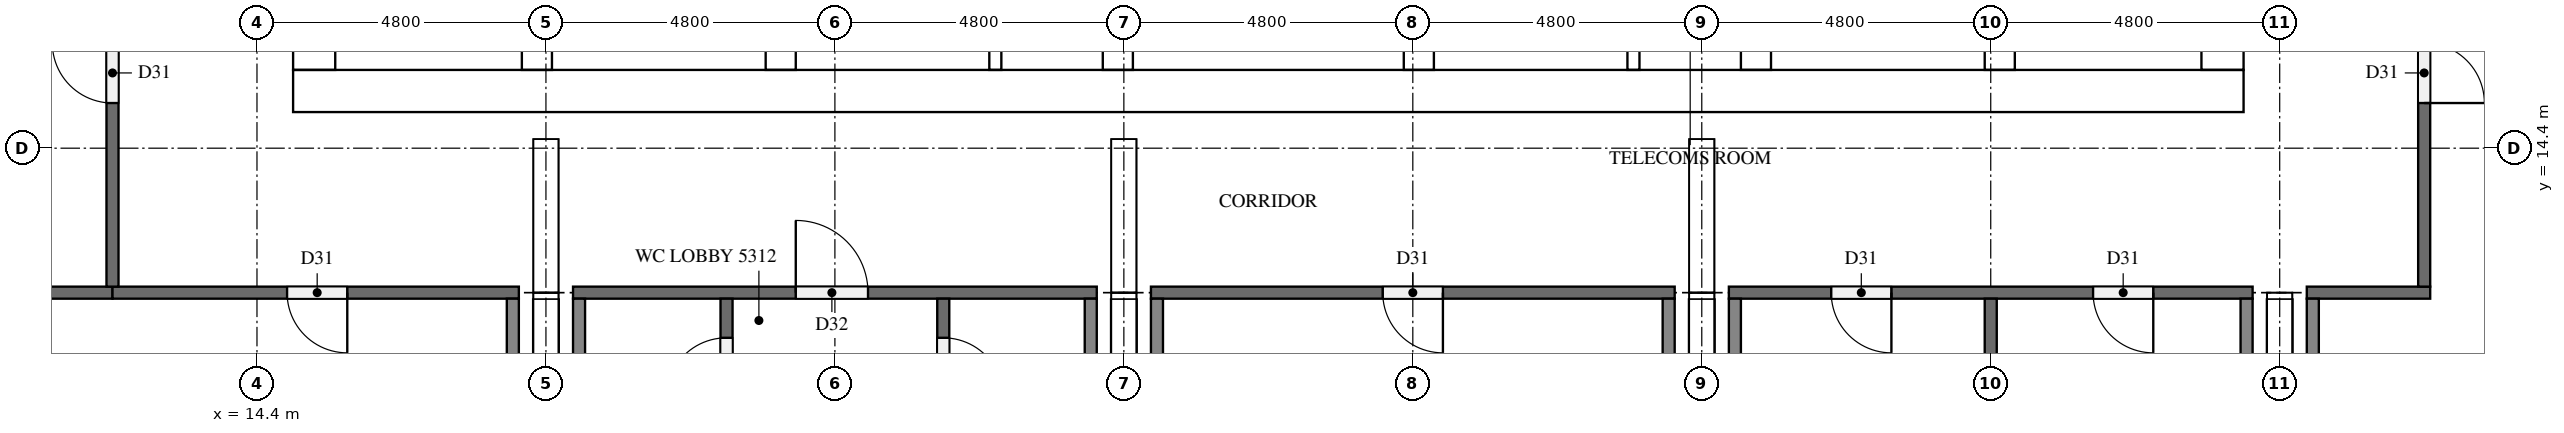
"""IFC4 building model, lengths in metres.
Left out: names, types, materials, properties, quantities, classifications, styles, units other than length and angle.
Written with IfcOpenShell. Run it as: python <this file> out.ifc"""

import sys

from ifc_helpers import new_model, si_unit, direction, frame, frame_2d, origin, place, context, subcontext, project, spatial, rectangle, extrude, element, fill, save


model = new_model("IFC4")
c1 = context("Model", 3, precision=1e-05, world=origin(), true_north=direction((0.0, 1.0)))
c2 = subcontext(c1, "Body", "Model", "MODEL_VIEW")
j1 = project(units=[si_unit("LENGTHUNIT", "METRE"), si_unit("PLANEANGLEUNIT", "RADIAN")], contexts=[c1])
p1 = place(None, origin())
s1 = spatial("IfcSite", under=j1, at=p1, CompositionType="ELEMENT")
p2 = place(p1, origin())
s2 = spatial("IfcBuilding", under=s1, at=p2, CompositionType="ELEMENT")
p3 = place(p2, frame((0.0, 0.0, 203.4)))
s3 = spatial("IfcBuildingStorey", under=s2, at=p3, CompositionType="ELEMENT", Elevation=203.4)
p4 = place(p3, frame((15.0, 15.35, 0.0), z_axis=(0.0, 0.0, 1.0), x_axis=(1.0, 0.0, 0.0)))
e1 = element("IfcWall", 1, at=p4, inside=s3, PredefinedType="SHEAR", context=c2, shape_type="SweptSolid", body=[
    extrude(rectangle(XDim=32.4, YDim=0.7, at=frame_2d((16.2, 0.0))), origin(), (0.0, 0.0, 1.0), 5.1),
])
p5 = place(p4, frame((15.3, 0.0, 0.0)))
e2 = element("IfcOpeningElement", 2, at=p5, cuts=e1, PredefinedType="OPENING", context=c2, shape_type="SweptSolid", body=[
    extrude(rectangle(XDim=1.8, YDim=2.1, at=frame_2d((0.9, 1.05))), frame((0.0, 0.36, 0.0), z_axis=(0.0, -1.0, 0.0), x_axis=(1.0, 0.0, 0.0)), (0.0, 0.0, 1.0), 0.72),
])
p6 = place(p3, frame((15.35, 15.7, 0.0), z_axis=(0.0, 0.0, 1.0), x_axis=(0.0, 1.0, 0.0)))
e3 = element("IfcWall", 3, at=p6, inside=s3, PredefinedType="SHEAR", context=c2, shape_type="SweptSolid", body=[
    extrude(rectangle(XDim=21.4, YDim=0.7, at=frame_2d((10.7, 0.0))), origin(), (0.0, 0.0, 1.0), 5.1),
])
p7 = place(p6, frame((5.06, 0.0, 0.0)))
e4 = element("IfcOpeningElement", 4, at=p7, cuts=e3, PredefinedType="OPENING", context=c2, shape_type="SweptSolid", body=[
    extrude(rectangle(XDim=1.2, YDim=2.1, at=frame_2d((0.6, 1.05))), frame((0.0, 0.36, 0.0), z_axis=(0.0, -1.0, 0.0), x_axis=(1.0, 0.0, 0.0)), (0.0, 0.0, 1.0), 0.72),
])
p8 = place(p3, frame((47.05, 15.7, 0.0), z_axis=(0.0, 0.0, 1.0), x_axis=(0.0, 1.0, 0.0)))
e5 = element("IfcWall", 5, at=p8, inside=s3, PredefinedType="SHEAR", context=c2, shape_type="SweptSolid", body=[
    extrude(rectangle(XDim=21.4, YDim=0.7, at=frame_2d((10.7, 0.0))), origin(), (0.0, 0.0, 1.0), 5.1),
])
p9 = place(p8, frame((10.4, 0.0, 0.0)))
e6 = element("IfcOpeningElement", 6, at=p9, cuts=e5, PredefinedType="OPENING", context=c2, shape_type="SweptSolid", body=[
    extrude(rectangle(XDim=1.2, YDim=2.1, at=frame_2d((0.6, 1.05))), frame((0.0, 0.36, 0.0), z_axis=(0.0, -1.0, 0.0), x_axis=(1.0, 0.0, 0.0)), (0.0, 0.0, 1.0), 0.72),
])
p10 = place(p3, frame((19.05, 15.7, 0.0), z_axis=(0.0, 0.0, 1.0), x_axis=(0.0, 1.0, 0.0)))
e7 = element("IfcWall", 7, at=p10, inside=s3, PredefinedType="SHEAR", context=c2, shape_type="SweptSolid", body=[
    extrude(rectangle(XDim=15.3, YDim=0.5, at=frame_2d((7.65, 0.0))), origin(), (0.0, 0.0, 1.0), 5.1),
])
p11 = place(p10, frame((9.75, 0.0, 0.0)))
e8 = element("IfcOpeningElement", 8, at=p11, cuts=e7, PredefinedType="OPENING", context=c2, shape_type="SweptSolid", body=[
    extrude(rectangle(XDim=1.1, YDim=2.1, at=frame_2d((0.55, 1.05))), frame((0.0, 0.26, 0.0), z_axis=(0.0, -1.0, 0.0), x_axis=(1.0, 0.0, 0.0)), (0.0, 0.0, 1.0), 0.52),
])
p12 = place(p10, frame((13.25, 0.0, 0.0)))
e9 = element("IfcOpeningElement", 9, at=p12, cuts=e7, PredefinedType="OPENING", context=c2, shape_type="SweptSolid", body=[
    extrude(rectangle(XDim=1.1, YDim=2.1, at=frame_2d((0.55, 1.05))), frame((0.0, 0.26, 0.0), z_axis=(0.0, -1.0, 0.0), x_axis=(1.0, 0.0, 0.0)), (0.0, 0.0, 1.0), 0.52),
])
p13 = place(p10, frame((0.5, 0.0, 0.0)))
e10 = element("IfcOpeningElement", 10, at=p13, cuts=e7, PredefinedType="OPENING", context=c2, shape_type="SweptSolid", body=[
    extrude(rectangle(XDim=1.2, YDim=2.1, at=frame_2d((0.6, 1.05))), frame((0.0, 0.26, 0.0), z_axis=(0.0, -1.0, 0.0), x_axis=(1.0, 0.0, 0.0)), (0.0, 0.0, 1.0), 0.52),
])
p14 = place(p3, frame((23.1, 15.7, 0.0), z_axis=(0.0, 0.0, 1.0), x_axis=(0.0, 1.0, 0.0)))
e11 = element("IfcWall", 11, at=p14, inside=s3, PredefinedType="SHEAR", context=c2, shape_type="SweptSolid", body=[
    extrude(rectangle(XDim=21.4, YDim=0.5, at=frame_2d((10.7, 0.0))), origin(), (0.0, 0.0, 1.0), 5.1),
])
p15 = place(p3, frame((39.3, 15.7, 0.0), z_axis=(0.0, 0.0, 1.0), x_axis=(0.0, 1.0, 0.0)))
e12 = element("IfcWall", 12, at=p15, inside=s3, PredefinedType="SHEAR", context=c2, shape_type="SweptSolid", body=[
    extrude(rectangle(XDim=8.55, YDim=0.5, at=frame_2d((4.275, 0.0))), origin(), (0.0, 0.0, 1.0), 5.1),
])
p16 = place(p3, frame((43.35, 15.7, 0.0), z_axis=(0.0, 0.0, 1.0), x_axis=(0.0, 1.0, 0.0)))
e13 = element("IfcWall", 13, at=p16, inside=s3, PredefinedType="SHEAR", context=c2, shape_type="SweptSolid", body=[
    extrude(rectangle(XDim=8.55, YDim=0.5, at=frame_2d((4.275, 0.0))), origin(), (0.0, 0.0, 1.0), 5.1),
])
p17 = place(p16, frame((0.5, 0.0, 0.0)))
e14 = element("IfcOpeningElement", 14, at=p17, cuts=e13, PredefinedType="OPENING", context=c2, shape_type="SweptSolid", body=[
    extrude(rectangle(XDim=1.2, YDim=2.1, at=frame_2d((0.6, 1.05))), frame((0.0, 0.26, 0.0), z_axis=(0.0, -1.0, 0.0), x_axis=(1.0, 0.0, 0.0)), (0.0, 0.0, 1.0), 0.52),
])
for number, where, z_axis, x_axis in (
    (15, (28.7, 15.7, 0.0), (0.0, 0.0, 1.0), (0.0, 1.0, 0.0)),
    (16, (33.7, 15.7, 0.0), (0.0, 0.0, 1.0), (0.0, 1.0, 0.0)),
):
    element("IfcWall", number, at=place(p3, frame(where, z_axis=z_axis, x_axis=x_axis)), inside=s3, PredefinedType="SHEAR", context=c2, shape_type="SweptSolid", body=[
        extrude(rectangle(XDim=2.8, YDim=0.5, at=frame_2d((1.4, 0.0))), origin(), (0.0, 0.0, 1.0), 5.1),
    ])
for number, where, z_axis, x_axis in (
    (17, (26.665, 15.7, 0.0), (0.0, 0.0, 1.0), (0.0, 1.0, 0.0)),
    (18, (37.265, 15.7, 0.0), (0.0, 0.0, 1.0), (0.0, 1.0, 0.0)),
):
    element("IfcWall", number, at=place(p3, frame(where, z_axis=z_axis, x_axis=x_axis)), inside=s3, PredefinedType="PARTITIONING", context=c2, shape_type="SweptSolid", body=[
        extrude(rectangle(XDim=2.8, YDim=0.2, at=frame_2d((1.4, 0.0))), origin(), (0.0, 0.0, 1.0), 5.1),
    ])
p18 = place(p3, frame((10.25, 12.0, 0.0), z_axis=(0.0, 0.0, 1.0), x_axis=(1.0, 0.0, 0.0)))
e19 = element("IfcWall", 19, at=p18, inside=s3, PredefinedType="PARTITIONING", context=c2, shape_type="SweptSolid", body=[
    extrude(rectangle(XDim=1.75, YDim=0.2, at=frame_2d((0.875, 0.0))), origin(), (0.0, 0.0, 1.0), 5.1),
])
p19 = place(p3, frame((18.75, 12.0, 0.0), z_axis=(0.0, 0.0, 1.0), x_axis=(-1.0, 0.0, 0.0)))
e20 = element("IfcWall", 20, at=p19, inside=s3, PredefinedType="PARTITIONING", context=c2, shape_type="SweptSolid", body=[
    extrude(rectangle(XDim=6.75, YDim=0.2, at=frame_2d((3.375, 0.0))), origin(), (0.0, 0.0, 1.0), 5.1),
])
p20 = place(p19, frame((2.85, 0.0, 0.0)))
e21 = element("IfcOpeningElement", 21, at=p20, cuts=e20, PredefinedType="OPENING", context=c2, shape_type="SweptSolid", body=[
    extrude(rectangle(XDim=1.0, YDim=2.1, at=frame_2d((0.5, 1.05))), frame((0.0, 0.11, 0.0), z_axis=(0.0, -1.0, 0.0), x_axis=(1.0, 0.0, 0.0)), (0.0, 0.0, 1.0), 0.22),
])
p21 = place(p3, frame((19.65, 12.0, 0.0), z_axis=(0.0, 0.0, 1.0), x_axis=(1.0, 0.0, 0.0)))
e22 = element("IfcWall", 22, at=p21, inside=s3, PredefinedType="PARTITIONING", context=c2, shape_type="SweptSolid", body=[
    extrude(rectangle(XDim=8.7, YDim=0.2, at=frame_2d((4.35, 0.0))), origin(), (0.0, 0.0, 1.0), 5.1),
])
p22 = place(p21, frame((3.7, 0.0, 0.0)))
e23 = element("IfcOpeningElement", 23, at=p22, cuts=e22, PredefinedType="OPENING", context=c2, shape_type="SweptSolid", body=[
    extrude(rectangle(XDim=1.2, YDim=2.1, at=frame_2d((0.6, 1.05))), frame((0.0, 0.11, 0.0), z_axis=(0.0, -1.0, 0.0), x_axis=(1.0, 0.0, 0.0)), (0.0, 0.0, 1.0), 0.22),
])
p23 = place(p3, frame((37.95, 12.0, 0.0), z_axis=(0.0, 0.0, 1.0), x_axis=(-1.0, 0.0, 0.0)))
e24 = element("IfcWall", 24, at=p23, inside=s3, PredefinedType="PARTITIONING", context=c2, shape_type="SweptSolid", body=[
    extrude(rectangle(XDim=8.7, YDim=0.2, at=frame_2d((4.35, 0.0))), origin(), (0.0, 0.0, 1.0), 5.1),
])
p24 = place(p23, frame((3.85, 0.0, 0.0)))
e25 = element("IfcOpeningElement", 25, at=p24, cuts=e24, PredefinedType="OPENING", context=c2, shape_type="SweptSolid", body=[
    extrude(rectangle(XDim=1.0, YDim=2.1, at=frame_2d((0.5, 1.05))), frame((0.0, 0.11, 0.0), z_axis=(0.0, -1.0, 0.0), x_axis=(1.0, 0.0, 0.0)), (0.0, 0.0, 1.0), 0.22),
])
p25 = place(p3, frame((47.55, 12.0, 0.0), z_axis=(0.0, 0.0, 1.0), x_axis=(-1.0, 0.0, 0.0)))
e26 = element("IfcWall", 26, at=p25, inside=s3, PredefinedType="PARTITIONING", context=c2, shape_type="SweptSolid", body=[
    extrude(rectangle(XDim=8.7, YDim=0.2, at=frame_2d((4.35, 0.0))), origin(), (0.0, 0.0, 1.0), 5.1),
])
p26 = place(p25, frame((6.0, 0.0, 0.0)))
e27 = element("IfcOpeningElement", 27, at=p26, cuts=e26, PredefinedType="OPENING", context=c2, shape_type="SweptSolid", body=[
    extrude(rectangle(XDim=1.0, YDim=2.1, at=frame_2d((0.5, 1.05))), frame((0.0, 0.11, 0.0), z_axis=(0.0, -1.0, 0.0), x_axis=(1.0, 0.0, 0.0)), (0.0, 0.0, 1.0), 0.22),
])
p27 = place(p25, frame((1.65, 0.0, 0.0)))
e28 = element("IfcOpeningElement", 28, at=p27, cuts=e26, PredefinedType="OPENING", context=c2, shape_type="SweptSolid", body=[
    extrude(rectangle(XDim=1.0, YDim=2.1, at=frame_2d((0.5, 1.05))), frame((0.0, 0.11, 0.0), z_axis=(0.0, -1.0, 0.0), x_axis=(1.0, 0.0, 0.0)), (0.0, 0.0, 1.0), 0.22),
])
p28 = place(p3, frame((48.45, 12.0, 0.0), z_axis=(0.0, 0.0, 1.0), x_axis=(1.0, 0.0, 0.0)))
e29 = element("IfcWall", 29, at=p28, inside=s3, PredefinedType="PARTITIONING", context=c2, shape_type="SweptSolid", body=[
    extrude(rectangle(XDim=2.05, YDim=0.2, at=frame_2d((1.025, 0.0))), origin(), (0.0, 0.0, 1.0), 5.1),
])
p29 = place(p3, frame((12.0, 12.1, 0.0), z_axis=(0.0, 0.0, 1.0), x_axis=(0.0, 1.0, 0.0)))
e30 = element("IfcWall", 30, at=p29, inside=s3, PredefinedType="PARTITIONING", context=c2, shape_type="SweptSolid", body=[
    extrude(rectangle(XDim=28.6, YDim=0.2, at=frame_2d((14.3, 0.0))), origin(), (0.0, 0.0, 1.0), 5.1),
])
p30 = place(p29, frame((3.05, 0.0, 0.0)))
e31 = element("IfcOpeningElement", 31, at=p30, cuts=e30, PredefinedType="OPENING", context=c2, shape_type="SweptSolid", body=[
    extrude(rectangle(XDim=1.0, YDim=2.1, at=frame_2d((0.5, 1.05))), frame((0.0, 0.11, 0.0), z_axis=(0.0, -1.0, 0.0), x_axis=(1.0, 0.0, 0.0)), (0.0, 0.0, 1.0), 0.22),
])
p31 = place(p29, frame((9.05, 0.0, 0.0)))
e32 = element("IfcOpeningElement", 32, at=p31, cuts=e30, PredefinedType="OPENING", context=c2, shape_type="SweptSolid", body=[
    extrude(rectangle(XDim=1.0, YDim=2.1, at=frame_2d((0.5, 1.05))), frame((0.0, 0.11, 0.0), z_axis=(0.0, -1.0, 0.0), x_axis=(1.0, 0.0, 0.0)), (0.0, 0.0, 1.0), 0.22),
])
p32 = place(p29, frame((16.25, 0.0, 0.0)))
e33 = element("IfcOpeningElement", 33, at=p32, cuts=e30, PredefinedType="OPENING", context=c2, shape_type="SweptSolid", body=[
    extrude(rectangle(XDim=1.0, YDim=2.1, at=frame_2d((0.5, 1.05))), frame((0.0, 0.11, 0.0), z_axis=(0.0, -1.0, 0.0), x_axis=(1.0, 0.0, 0.0)), (0.0, 0.0, 1.0), 0.22),
])
p33 = place(p29, frame((24.55, 0.0, 0.0)))
e34 = element("IfcOpeningElement", 34, at=p33, cuts=e30, PredefinedType="OPENING", context=c2, shape_type="SweptSolid", body=[
    extrude(rectangle(XDim=1.0, YDim=2.1, at=frame_2d((0.5, 1.05))), frame((0.0, 0.11, 0.0), z_axis=(0.0, -1.0, 0.0), x_axis=(1.0, 0.0, 0.0)), (0.0, 0.0, 1.0), 0.22),
])
for number, where, z_axis, x_axis in (
    (35, (18.65, 7.1, 0.0), (0.0, 0.0, 1.0), (0.0, 1.0, 0.0)),
    (36, (19.75, 7.1, 0.0), (0.0, 0.0, 1.0), (0.0, 1.0, 0.0)),
):
    element("IfcWall", number, at=place(p3, frame(where, z_axis=z_axis, x_axis=x_axis)), inside=s3, PredefinedType="PARTITIONING", context=c2, shape_type="SweptSolid", body=[
        extrude(rectangle(XDim=4.8, YDim=0.2, at=frame_2d((2.4, 0.0))), origin(), (0.0, 0.0, 1.0), 5.1),
    ])
p34 = place(p3, frame((22.2, 7.1, 0.0), z_axis=(0.0, 0.0, 1.0), x_axis=(0.0, 1.0, 0.0)))
e37 = element("IfcWall", 37, at=p34, inside=s3, PredefinedType="PARTITIONING", context=c2, shape_type="SweptSolid", body=[
    extrude(rectangle(XDim=4.8, YDim=0.2, at=frame_2d((2.4, 0.0))), origin(), (0.0, 0.0, 1.0), 5.1),
])
p35 = place(p34, frame((3.15, 0.0, 0.0)))
e38 = element("IfcOpeningElement", 38, at=p35, cuts=e37, PredefinedType="OPENING", context=c2, shape_type="SweptSolid", body=[
    extrude(rectangle(XDim=1.0, YDim=2.1, at=frame_2d((0.5, 1.05))), frame((0.0, 0.11, 0.0), z_axis=(0.0, -1.0, 0.0), x_axis=(1.0, 0.0, 0.0)), (0.0, 0.0, 1.0), 0.22),
])
p36 = place(p3, frame((25.8, 11.9, 0.0), z_axis=(0.0, 0.0, 1.0), x_axis=(0.0, -1.0, 0.0)))
e39 = element("IfcWall", 39, at=p36, inside=s3, PredefinedType="PARTITIONING", context=c2, shape_type="SweptSolid", body=[
    extrude(rectangle(XDim=4.8, YDim=0.2, at=frame_2d((2.4, 0.0))), origin(), (0.0, 0.0, 1.0), 5.1),
])
p37 = place(p36, frame((0.65, 0.0, 0.0)))
e40 = element("IfcOpeningElement", 40, at=p37, cuts=e39, PredefinedType="OPENING", context=c2, shape_type="SweptSolid", body=[
    extrude(rectangle(XDim=1.0, YDim=2.1, at=frame_2d((0.5, 1.05))), frame((0.0, 0.11, 0.0), z_axis=(0.0, -1.0, 0.0), x_axis=(1.0, 0.0, 0.0)), (0.0, 0.0, 1.0), 0.22),
])
for number, where, z_axis, x_axis in (
    (41, (28.25, 7.1, 0.0), (0.0, 0.0, 1.0), (0.0, 1.0, 0.0)),
    (42, (29.35, 7.1, 0.0), (0.0, 0.0, 1.0), (0.0, 1.0, 0.0)),
    (43, (37.85, 7.1, 0.0), (0.0, 0.0, 1.0), (0.0, 1.0, 0.0)),
    (44, (38.95, 7.1, 0.0), (0.0, 0.0, 1.0), (0.0, 1.0, 0.0)),
    (45, (43.2, 7.1, 0.0), (0.0, 0.0, 1.0), (0.0, 1.0, 0.0)),
    (46, (47.45, 7.1, 0.0), (0.0, 0.0, 1.0), (0.0, 1.0, 0.0)),
    (47, (48.55, 7.1, 0.0), (0.0, 0.0, 1.0), (0.0, 1.0, 0.0)),
):
    element("IfcWall", number, at=place(p3, frame(where, z_axis=z_axis, x_axis=x_axis)), inside=s3, PredefinedType="PARTITIONING", context=c2, shape_type="SweptSolid", body=[
        extrude(rectangle(XDim=4.8, YDim=0.2, at=frame_2d((2.4, 0.0))), origin(), (0.0, 0.0, 1.0), 5.1),
    ])
p38 = place(p3, frame((50.4, 40.7, 0.0), z_axis=(0.0, 0.0, 1.0), x_axis=(0.0, -1.0, 0.0)))
e48 = element("IfcWall", 48, at=p38, inside=s3, PredefinedType="PARTITIONING", context=c2, shape_type="SweptSolid", body=[
    extrude(rectangle(XDim=28.6, YDim=0.2, at=frame_2d((14.3, 0.0))), origin(), (0.0, 0.0, 1.0), 5.1),
])
p39 = place(p38, frame((24.55, 0.0, 0.0)))
e49 = element("IfcOpeningElement", 49, at=p39, cuts=e48, PredefinedType="OPENING", context=c2, shape_type="SweptSolid", body=[
    extrude(rectangle(XDim=1.0, YDim=2.1, at=frame_2d((0.5, 1.05))), frame((0.0, 0.11, 0.0), z_axis=(0.0, -1.0, 0.0), x_axis=(1.0, 0.0, 0.0)), (0.0, 0.0, 1.0), 0.22),
])
p40 = place(p38, frame((18.65, 0.0, 0.0)))
e50 = element("IfcOpeningElement", 50, at=p40, cuts=e48, PredefinedType="OPENING", context=c2, shape_type="SweptSolid", body=[
    extrude(rectangle(XDim=1.0, YDim=2.1, at=frame_2d((0.5, 1.05))), frame((0.0, 0.11, 0.0), z_axis=(0.0, -1.0, 0.0), x_axis=(1.0, 0.0, 0.0)), (0.0, 0.0, 1.0), 0.22),
])
p41 = place(p38, frame((11.45, 0.0, 0.0)))
e51 = element("IfcOpeningElement", 51, at=p41, cuts=e48, PredefinedType="OPENING", context=c2, shape_type="SweptSolid", body=[
    extrude(rectangle(XDim=1.0, YDim=2.1, at=frame_2d((0.5, 1.05))), frame((0.0, 0.11, 0.0), z_axis=(0.0, -1.0, 0.0), x_axis=(1.0, 0.0, 0.0)), (0.0, 0.0, 1.0), 0.22),
])
p42 = place(p38, frame((3.05, 0.0, 0.0)))
e52 = element("IfcOpeningElement", 52, at=p42, cuts=e48, PredefinedType="OPENING", context=c2, shape_type="SweptSolid", body=[
    extrude(rectangle(XDim=1.0, YDim=2.1, at=frame_2d((0.5, 1.05))), frame((0.0, 0.11, 0.0), z_axis=(0.0, -1.0, 0.0), x_axis=(1.0, 0.0, 0.0)), (0.0, 0.0, 1.0), 0.22),
])
p43 = place(p5, frame((1.8, 0.0, 0.0), z_axis=(0.0, 0.0, 1.0), x_axis=(-1.0, 0.0, 0.0)))
e53 = element("IfcDoor", 53, at=p43, inside=s3, OperationType="DOUBLE_DOOR_SINGLE_SWING", PredefinedType="DOOR", context=c2, shape_type="SweptSolid", body=[
    extrude(rectangle(XDim=1.8, YDim=2.1, at=frame_2d((0.9, 1.05))), frame((0.0, 0.025, 0.0), z_axis=(0.0, -1.0, 0.0), x_axis=(1.0, 0.0, 0.0)), (0.0, 0.0, 1.0), 0.05),
])
fill(e2, e53)
p44 = place(p39, origin())
e54 = element("IfcDoor", 54, at=p44, inside=s3, OperationType="SINGLE_SWING_RIGHT", PredefinedType="DOOR", context=c2, shape_type="SweptSolid", body=[
    extrude(rectangle(XDim=1.0, YDim=2.1, at=frame_2d((0.5, 1.05))), frame((0.0, 0.025, 0.0), z_axis=(0.0, -1.0, 0.0), x_axis=(1.0, 0.0, 0.0)), (0.0, 0.0, 1.0), 0.05),
])
fill(e49, e54)
p45 = place(p20, origin())
e55 = element("IfcDoor", 55, at=p45, inside=s3, OperationType="SINGLE_SWING_LEFT", PredefinedType="DOOR", context=c2, shape_type="SweptSolid", body=[
    extrude(rectangle(XDim=1.0, YDim=2.1, at=frame_2d((0.5, 1.05))), frame((0.0, 0.025, 0.0), z_axis=(0.0, -1.0, 0.0), x_axis=(1.0, 0.0, 0.0)), (0.0, 0.0, 1.0), 0.05),
])
fill(e21, e55)
p46 = place(p22, origin())
e56 = element("IfcDoor", 56, at=p46, inside=s3, OperationType="SINGLE_SWING_LEFT", PredefinedType="DOOR", context=c2, shape_type="SweptSolid", body=[
    extrude(rectangle(XDim=1.2, YDim=2.1, at=frame_2d((0.6, 1.05))), frame((0.0, 0.025, 0.0), z_axis=(0.0, -1.0, 0.0), x_axis=(1.0, 0.0, 0.0)), (0.0, 0.0, 1.0), 0.05),
])
fill(e23, e56)
p47 = place(p35, origin())
e57 = element("IfcDoor", 57, at=p47, inside=s3, OperationType="SINGLE_SWING_LEFT", PredefinedType="DOOR", context=c2, shape_type="SweptSolid", body=[
    extrude(rectangle(XDim=1.0, YDim=2.1, at=frame_2d((0.5, 1.05))), frame((0.0, 0.025, 0.0), z_axis=(0.0, -1.0, 0.0), x_axis=(1.0, 0.0, 0.0)), (0.0, 0.0, 1.0), 0.05),
])
fill(e38, e57)
p48 = place(p37, origin())
e58 = element("IfcDoor", 58, at=p48, inside=s3, OperationType="SINGLE_SWING_RIGHT", PredefinedType="DOOR", context=c2, shape_type="SweptSolid", body=[
    extrude(rectangle(XDim=1.0, YDim=2.1, at=frame_2d((0.5, 1.05))), frame((0.0, 0.025, 0.0), z_axis=(0.0, -1.0, 0.0), x_axis=(1.0, 0.0, 0.0)), (0.0, 0.0, 1.0), 0.05),
])
fill(e40, e58)
p49 = place(p24, origin())
e59 = element("IfcDoor", 59, at=p49, inside=s3, OperationType="SINGLE_SWING_LEFT", PredefinedType="DOOR", context=c2, shape_type="SweptSolid", body=[
    extrude(rectangle(XDim=1.0, YDim=2.1, at=frame_2d((0.5, 1.05))), frame((0.0, 0.025, 0.0), z_axis=(0.0, -1.0, 0.0), x_axis=(1.0, 0.0, 0.0)), (0.0, 0.0, 1.0), 0.05),
])
fill(e25, e59)
p50 = place(p26, origin())
e60 = element("IfcDoor", 60, at=p50, inside=s3, OperationType="SINGLE_SWING_LEFT", PredefinedType="DOOR", context=c2, shape_type="SweptSolid", body=[
    extrude(rectangle(XDim=1.0, YDim=2.1, at=frame_2d((0.5, 1.05))), frame((0.0, 0.025, 0.0), z_axis=(0.0, -1.0, 0.0), x_axis=(1.0, 0.0, 0.0)), (0.0, 0.0, 1.0), 0.05),
])
fill(e27, e60)
p51 = place(p27, origin())
e61 = element("IfcDoor", 61, at=p51, inside=s3, OperationType="SINGLE_SWING_LEFT", PredefinedType="DOOR", context=c2, shape_type="SweptSolid", body=[
    extrude(rectangle(XDim=1.0, YDim=2.1, at=frame_2d((0.5, 1.05))), frame((0.0, 0.025, 0.0), z_axis=(0.0, -1.0, 0.0), x_axis=(1.0, 0.0, 0.0)), (0.0, 0.0, 1.0), 0.05),
])
fill(e28, e61)
p52 = place(p30, origin())
e62 = element("IfcDoor", 62, at=p52, inside=s3, OperationType="SINGLE_SWING_RIGHT", PredefinedType="DOOR", context=c2, shape_type="SweptSolid", body=[
    extrude(rectangle(XDim=1.0, YDim=2.1, at=frame_2d((0.5, 1.05))), frame((0.0, 0.025, 0.0), z_axis=(0.0, -1.0, 0.0), x_axis=(1.0, 0.0, 0.0)), (0.0, 0.0, 1.0), 0.05),
])
fill(e31, e62)
save(model, sys.argv[1])
